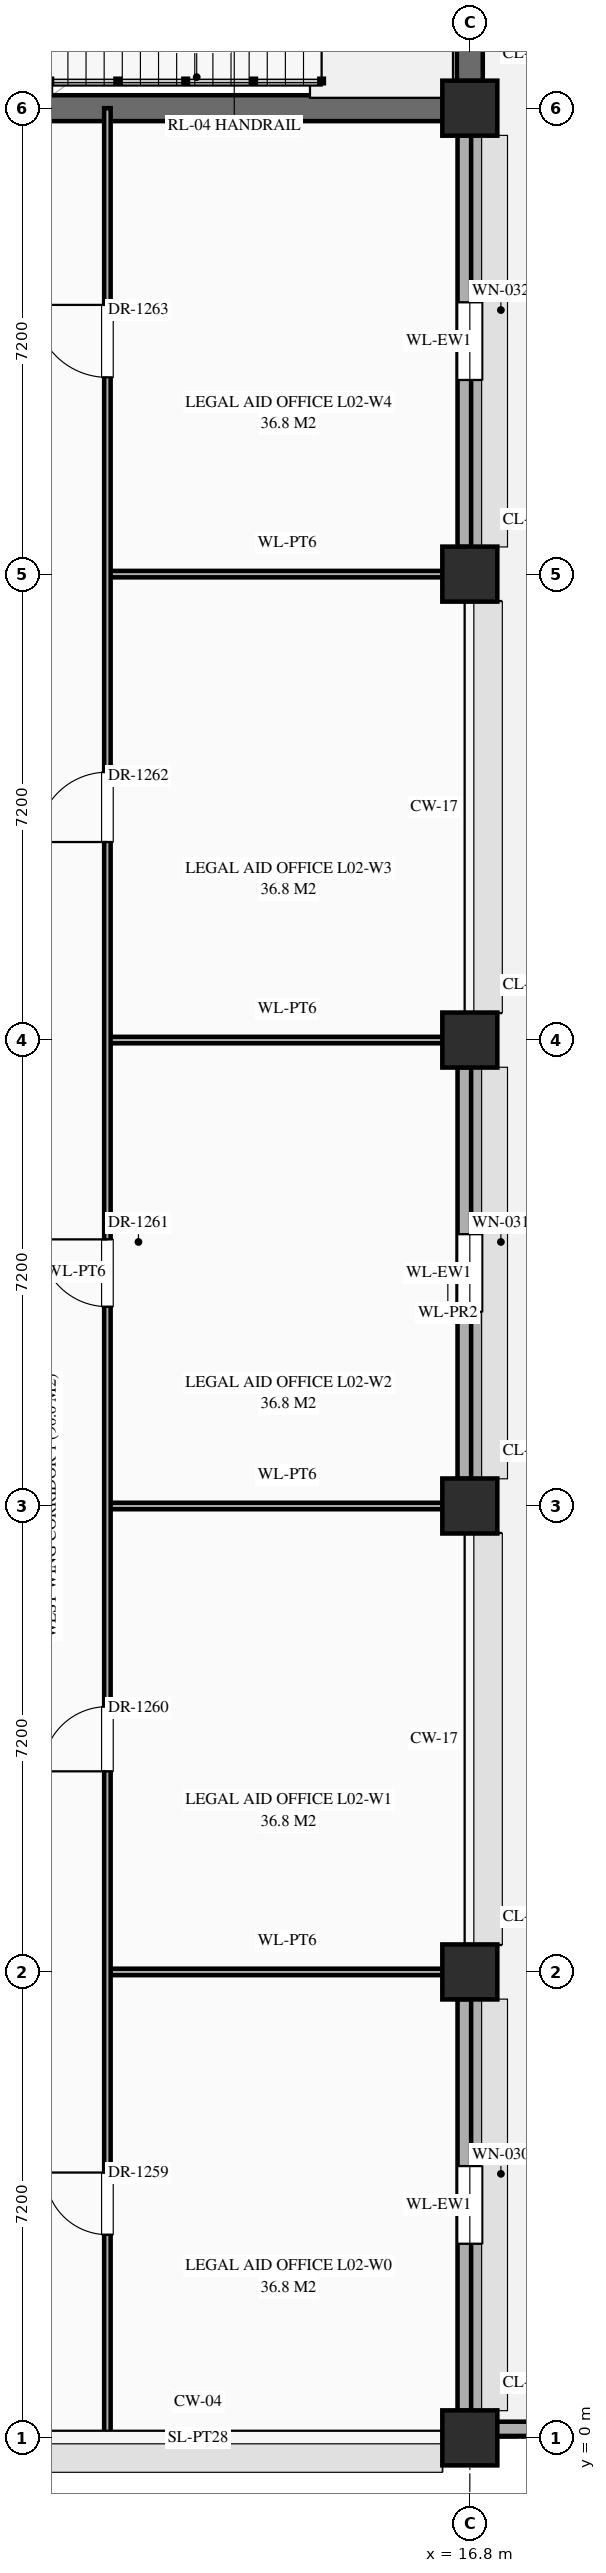
"""IFC4 building model, lengths in metres.
Left out: names, types, materials, properties, quantities, classifications, styles, units other than length and angle.
Written with IfcOpenShell. Run it as: python <this file> out.ifc"""

import sys

from ifc_helpers import new_model, si_unit, direction, frame, frame_2d, origin, origin_2d, place, context, subcontext, project, spatial, rectangle, extrude, element, fill, save


model = new_model("IFC4")
c1 = context("Model", 3, precision=1e-05, world=origin(), true_north=direction((0.0, 1.0)))
c2 = subcontext(c1, "Body", "Model", "MODEL_VIEW")
j1 = project(units=[si_unit("LENGTHUNIT", "METRE"), si_unit("PLANEANGLEUNIT", "RADIAN")], contexts=[c1])
p1 = place(None, origin())
s1 = spatial("IfcSite", under=j1, at=p1, CompositionType="ELEMENT")
p2 = place(p1, origin())
s2 = spatial("IfcBuilding", under=s1, at=p2, CompositionType="ELEMENT")
p3 = place(p2, frame((0.0, 0.0, 5.4)))
s3 = spatial("IfcBuildingStorey", under=s2, at=p3, CompositionType="ELEMENT", Elevation=5.4)
for number, where, z_axis, x_axis in (
    (1, (16.8, 0.0, 0.0), (0.0, 0.0, 1.0), (1.0, 0.0, 0.0)),
    (2, (16.8, 7.2, 0.0), (0.0, 0.0, 1.0), (1.0, 0.0, 0.0)),
    (3, (16.8, 14.4, 0.0), (0.0, 0.0, 1.0), (1.0, 0.0, 0.0)),
    (4, (16.8, 21.6, 0.0), (0.0, 0.0, 1.0), (1.0, 0.0, 0.0)),
    (5, (16.8, 28.8, 0.0), (0.0, 0.0, 1.0), (1.0, 0.0, 0.0)),
    (6, (16.8, 36.0, 0.0), (0.0, 0.0, 1.0), (1.0, 0.0, 0.0)),
):
    element("IfcColumn", number, at=place(p3, frame(where, z_axis=z_axis, x_axis=x_axis)), inside=s3, PredefinedType="COLUMN", context=c2, shape_type="SweptSolid", body=[
        extrude(rectangle(XDim=0.85, YDim=0.85, at=origin_2d()), origin(), (0.0, 0.0, 1.0), 5.4),
    ])
p4 = place(p3, frame((16.8, 0.42, 0.0), z_axis=(0.0, 0.0, 1.0), x_axis=(0.0, 1.0, 0.0)))
e7 = element("IfcWall", 7, at=p4, inside=s3, PredefinedType="STANDARD", context=c2, shape_type="SweptSolid", body=[
    extrude(rectangle(XDim=6.36, YDim=0.38, at=frame_2d((3.18, 0.0))), origin(), (0.0, 0.0, 1.0), 4.4),
])
p5 = place(p4, frame((2.58, 0.0, 0.85)))
e8 = element("IfcOpeningElement", 8, at=p5, cuts=e7, PredefinedType="OPENING", context=c2, shape_type="SweptSolid", body=[
    extrude(rectangle(XDim=1.2, YDim=1.2, at=frame_2d((0.6, 0.6))), frame((0.0, 0.202, 0.0), z_axis=(0.0, -1.0, 0.0), x_axis=(1.0, 0.0, 0.0)), (0.0, 0.0, 1.0), 0.404),
])
p6 = place(p3, frame((16.8, 14.82, 0.0), z_axis=(0.0, 0.0, 1.0), x_axis=(0.0, 1.0, 0.0)))
e9 = element("IfcWall", 9, at=p6, inside=s3, PredefinedType="STANDARD", context=c2, shape_type="SweptSolid", body=[
    extrude(rectangle(XDim=6.36, YDim=0.38, at=frame_2d((3.18, 0.0))), origin(), (0.0, 0.0, 1.0), 4.4),
])
p7 = place(p6, frame((2.58, 0.0, 0.85)))
e10 = element("IfcOpeningElement", 10, at=p7, cuts=e9, PredefinedType="OPENING", context=c2, shape_type="SweptSolid", body=[
    extrude(rectangle(XDim=1.2, YDim=1.56, at=frame_2d((0.6, 0.78))), frame((0.0, 0.202, 0.0), z_axis=(0.0, -1.0, 0.0), x_axis=(1.0, 0.0, 0.0)), (0.0, 0.0, 1.0), 0.404),
])
p8 = place(p3, frame((16.8, 29.22, 0.0), z_axis=(0.0, 0.0, 1.0), x_axis=(0.0, 1.0, 0.0)))
e11 = element("IfcWall", 11, at=p8, inside=s3, PredefinedType="STANDARD", context=c2, shape_type="SweptSolid", body=[
    extrude(rectangle(XDim=6.36, YDim=0.38, at=frame_2d((3.18, 0.0))), origin(), (0.0, 0.0, 1.0), 4.4),
])
p9 = place(p8, frame((2.58, 0.0, 0.85)))
e12 = element("IfcOpeningElement", 12, at=p9, cuts=e11, PredefinedType="OPENING", context=c2, shape_type="SweptSolid", body=[
    extrude(rectangle(XDim=1.2, YDim=1.92, at=frame_2d((0.6, 0.96))), frame((0.0, 0.202, 0.0), z_axis=(0.0, -1.0, 0.0), x_axis=(1.0, 0.0, 0.0)), (0.0, 0.0, 1.0), 0.404),
])
p10 = place(p3, frame((16.8, 36.42, 0.0), z_axis=(0.0, 0.0, 1.0), x_axis=(0.0, 1.0, 0.0)))
e13 = element("IfcWall", 13, at=p10, inside=s3, PredefinedType="SHEAR", context=c2, shape_type="SweptSolid", body=[
    extrude(rectangle(XDim=6.36, YDim=0.4, at=frame_2d((3.18, 0.0))), origin(), (0.0, 0.0, 1.0), 5.12),
])
p11 = place(p3, frame((16.94, 0.14, 4.8), z_axis=(0.0, 0.0, 1.0), x_axis=(1.0, 0.0, 0.0)))
e14 = element("IfcWall", 14, at=p11, inside=s3, PredefinedType="PARAPET", context=c2, shape_type="SweptSolid", body=[
    extrude(rectangle(XDim=4.22, YDim=0.22, at=frame_2d((2.11, 0.0))), origin(), (0.0, 0.0, 1.0), 1.2),
])
p12 = place(p3, frame((16.94, 35.735, 4.8), z_axis=(0.0, 0.0, 1.0), x_axis=(0.0, -1.0, 0.0)))
e15 = element("IfcWall", 15, at=p12, inside=s3, PredefinedType="PARAPET", context=c2, shape_type="SweptSolid", body=[
    extrude(rectangle(XDim=35.595, YDim=0.24, at=frame_2d((17.797, 0.0))), origin(), (0.0, 0.0, 1.0), 1.2),
])
for number, where, z_axis, x_axis in (
    (16, (11.2, 7.2, 0.0), (0.0, 0.0, 1.0), (1.0, 0.0, 0.0)),
    (17, (11.2, 14.4, 0.0), (0.0, 0.0, 1.0), (1.0, 0.0, 0.0)),
    (18, (11.2, 21.6, 0.0), (0.0, 0.0, 1.0), (1.0, 0.0, 0.0)),
    (19, (11.2, 28.8, 0.0), (0.0, 0.0, 1.0), (1.0, 0.0, 0.0)),
):
    element("IfcWall", number, at=place(p3, frame(where, z_axis=z_axis, x_axis=x_axis)), inside=s3, PredefinedType="STANDARD", context=c2, shape_type="SweptSolid", body=[
        extrude(rectangle(XDim=5.56, YDim=0.1, at=frame_2d((2.78, 0.0))), origin(), (0.0, 0.0, 1.0), 4.2),
    ])
p13 = place(p3, frame((8.4, 36.0, 0.0), z_axis=(0.0, 0.0, 1.0), x_axis=(1.0, 0.0, 0.0)))
e20 = element("IfcWall", 20, at=p13, inside=s3, PredefinedType="SHEAR", context=c2, shape_type="SweptSolid", body=[
    extrude(rectangle(XDim=8.36, YDim=0.4, at=frame_2d((4.18, 0.0))), origin(), (0.0, 0.0, 1.0), 5.05),
])
p14 = place(p3, frame((11.2, 0.04, 0.0), z_axis=(0.0, 0.0, 1.0), x_axis=(0.0, 1.0, 0.0)))
e21 = element("IfcWall", 21, at=p14, inside=s3, PredefinedType="STANDARD", context=c2, shape_type="SweptSolid", body=[
    extrude(rectangle(XDim=35.96, YDim=0.1, at=frame_2d((17.98, 0.0))), origin(), (0.0, 0.0, 1.0), 5.05),
])
p15 = place(p14, frame((3.1, 0.0, 0.0)))
e22 = element("IfcOpeningElement", 22, at=p15, cuts=e21, PredefinedType="OPENING", context=c2, shape_type="SweptSolid", body=[
    extrude(rectangle(XDim=0.96, YDim=2.2, at=frame_2d((0.48, 1.1))), frame((0.0, 0.062, 0.0), z_axis=(0.0, -1.0, 0.0), x_axis=(1.0, 0.0, 0.0)), (0.0, 0.0, 1.0), 0.124),
])
p16 = place(p14, frame((10.26, 0.0, 0.0)))
e23 = element("IfcOpeningElement", 23, at=p16, cuts=e21, PredefinedType="OPENING", context=c2, shape_type="SweptSolid", body=[
    extrude(rectangle(XDim=1.0, YDim=2.25, at=frame_2d((0.5, 1.125))), frame((0.0, 0.062, 0.0), z_axis=(0.0, -1.0, 0.0), x_axis=(1.0, 0.0, 0.0)), (0.0, 0.0, 1.0), 0.124),
])
p17 = place(p14, frame((17.44, 0.0, 0.0)))
e24 = element("IfcOpeningElement", 24, at=p17, cuts=e21, PredefinedType="OPENING", context=c2, shape_type="SweptSolid", body=[
    extrude(rectangle(XDim=1.04, YDim=2.2, at=frame_2d((0.52, 1.1))), frame((0.0, 0.062, 0.0), z_axis=(0.0, -1.0, 0.0), x_axis=(1.0, 0.0, 0.0)), (0.0, 0.0, 1.0), 0.124),
])
p18 = place(p14, frame((24.62, 0.0, 0.0)))
e25 = element("IfcOpeningElement", 25, at=p18, cuts=e21, PredefinedType="OPENING", context=c2, shape_type="SweptSolid", body=[
    extrude(rectangle(XDim=1.08, YDim=2.25, at=frame_2d((0.54, 1.125))), frame((0.0, 0.062, 0.0), z_axis=(0.0, -1.0, 0.0), x_axis=(1.0, 0.0, 0.0)), (0.0, 0.0, 1.0), 0.124),
])
p19 = place(p14, frame((31.8, 0.0, 0.0)))
e26 = element("IfcOpeningElement", 26, at=p19, cuts=e21, PredefinedType="OPENING", context=c2, shape_type="SweptSolid", body=[
    extrude(rectangle(XDim=1.12, YDim=2.25, at=frame_2d((0.56, 1.125))), frame((0.0, 0.062, 0.0), z_axis=(0.0, -1.0, 0.0), x_axis=(1.0, 0.0, 0.0)), (0.0, 0.0, 1.0), 0.124),
])
p20 = place(p5, origin())
e27 = element("IfcWindow", 27, at=p20, inside=s3, PartitioningType="SINGLE_PANEL", PredefinedType="WINDOW", context=c2, shape_type="SweptSolid", body=[
    extrude(rectangle(XDim=1.2, YDim=1.2, at=frame_2d((0.6, 0.6))), frame((0.0, 0.03, 0.0), z_axis=(0.0, -1.0, 0.0), x_axis=(1.0, 0.0, 0.0)), (0.0, 0.0, 1.0), 0.06),
])
fill(e8, e27)
p21 = place(p7, origin())
e28 = element("IfcWindow", 28, at=p21, inside=s3, PartitioningType="SINGLE_PANEL", PredefinedType="WINDOW", context=c2, shape_type="SweptSolid", body=[
    extrude(rectangle(XDim=1.2, YDim=1.56, at=frame_2d((0.6, 0.78))), frame((0.0, 0.03, 0.0), z_axis=(0.0, -1.0, 0.0), x_axis=(1.0, 0.0, 0.0)), (0.0, 0.0, 1.0), 0.06),
])
fill(e10, e28)
p22 = place(p9, origin())
e29 = element("IfcWindow", 29, at=p22, inside=s3, PartitioningType="SINGLE_PANEL", PredefinedType="WINDOW", context=c2, shape_type="SweptSolid", body=[
    extrude(rectangle(XDim=1.2, YDim=1.92, at=frame_2d((0.6, 0.96))), frame((0.0, 0.03, 0.0), z_axis=(0.0, -1.0, 0.0), x_axis=(1.0, 0.0, 0.0)), (0.0, 0.0, 1.0), 0.06),
])
fill(e12, e29)
p23 = place(p15, origin())
e30 = element("IfcDoor", 30, at=p23, inside=s3, OperationType="SINGLE_SWING_RIGHT", PredefinedType="DOOR", context=c2, shape_type="SweptSolid", body=[
    extrude(rectangle(XDim=0.96, YDim=2.2, at=frame_2d((0.48, 1.1))), frame((0.0, 0.025, 0.0), z_axis=(0.0, -1.0, 0.0), x_axis=(1.0, 0.0, 0.0)), (0.0, 0.0, 1.0), 0.05),
])
fill(e22, e30)
p24 = place(p16, origin())
e31 = element("IfcDoor", 31, at=p24, inside=s3, OperationType="SINGLE_SWING_LEFT", PredefinedType="DOOR", context=c2, shape_type="SweptSolid", body=[
    extrude(rectangle(XDim=1.0, YDim=2.25, at=frame_2d((0.5, 1.125))), frame((0.0, 0.025, 0.0), z_axis=(0.0, -1.0, 0.0), x_axis=(1.0, 0.0, 0.0)), (0.0, 0.0, 1.0), 0.05),
])
fill(e23, e31)
p25 = place(p17, origin())
e32 = element("IfcDoor", 32, at=p25, inside=s3, OperationType="SINGLE_SWING_RIGHT", PredefinedType="DOOR", context=c2, shape_type="SweptSolid", body=[
    extrude(rectangle(XDim=1.04, YDim=2.2, at=frame_2d((0.52, 1.1))), frame((0.0, 0.025, 0.0), z_axis=(0.0, -1.0, 0.0), x_axis=(1.0, 0.0, 0.0)), (0.0, 0.0, 1.0), 0.05),
])
fill(e24, e32)
p26 = place(p18, origin())
e33 = element("IfcDoor", 33, at=p26, inside=s3, OperationType="SINGLE_SWING_LEFT", PredefinedType="DOOR", context=c2, shape_type="SweptSolid", body=[
    extrude(rectangle(XDim=1.08, YDim=2.25, at=frame_2d((0.54, 1.125))), frame((0.0, 0.025, 0.0), z_axis=(0.0, -1.0, 0.0), x_axis=(1.0, 0.0, 0.0)), (0.0, 0.0, 1.0), 0.05),
])
fill(e25, e33)
p27 = place(p19, origin())
e34 = element("IfcDoor", 34, at=p27, inside=s3, OperationType="SINGLE_SWING_RIGHT", PredefinedType="DOOR", context=c2, shape_type="SweptSolid", body=[
    extrude(rectangle(XDim=1.12, YDim=2.25, at=frame_2d((0.56, 1.125))), frame((0.0, 0.025, 0.0), z_axis=(0.0, -1.0, 0.0), x_axis=(1.0, 0.0, 0.0)), (0.0, 0.0, 1.0), 0.05),
])
fill(e26, e34)
save(model, sys.argv[1])
